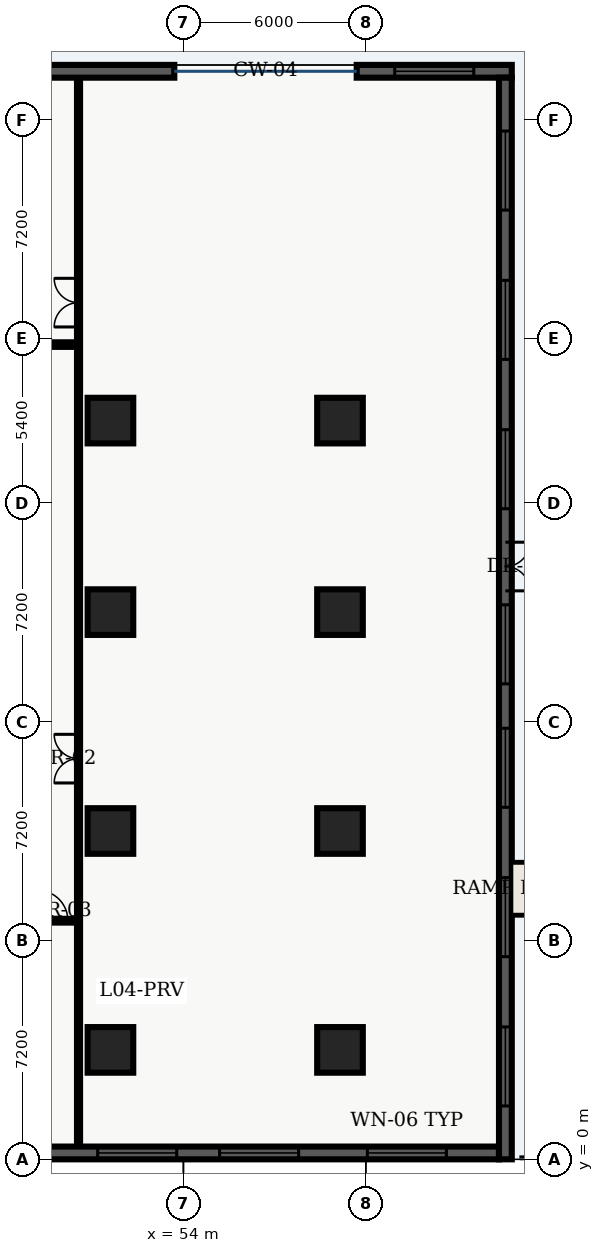
"""IFC4 building model, lengths in metres.
Left out: names, types, materials, properties, quantities, classifications, styles, units other than length and angle.
Written with IfcOpenShell. Run it as: python <this file> out.ifc"""

import sys

from ifc_helpers import new_model, entity, si_unit, converted_unit, direction, frame, origin_with_axes, origin_2d_with_axis, place, context, subcontext, project, spatial, polyline, rectangle, outline, extrude, element, fill, save


model = new_model("IFC4")
c1 = context("Model", 3, precision=1e-05, world=origin_with_axes(), true_north=direction((0.0, 1.0)))
c2 = subcontext(c1, "Body", "Model", "MODEL_VIEW")
j1 = project(units=[si_unit("LENGTHUNIT", "METRE"), converted_unit("PLANEANGLEUNIT", "DEGREE", entity("IfcPlaneAngleMeasure", 0.017), si_unit("PLANEANGLEUNIT", "RADIAN"), dimensions=[0, 0, 0, 0, 0, 0, 0])], contexts=[c1])
p1 = place(None, origin_with_axes())
s1 = spatial("IfcSite", under=j1, at=p1, CompositionType="ELEMENT")
p2 = place(p1, origin_with_axes())
s2 = spatial("IfcBuilding", under=s1, at=p2, CompositionType="ELEMENT")
p3 = place(p2, frame((0.0, 0.0, 19.8), z_axis=(0.0, 0.0, 1.0), x_axis=(1.0, 0.0, 0.0)))
s3 = spatial("IfcBuildingStorey", under=s2, at=p3, CompositionType="ELEMENT", Elevation=19.8)
for number, where, z_axis, x_axis in (
    (1, (51.6, 3.6, 0.0), (0.0, 0.0, 1.0), (1.0, 0.0, 0.0)),
    (2, (51.6, 10.8, 0.0), (0.0, 0.0, 1.0), (1.0, 0.0, 0.0)),
    (3, (51.6, 18.0, 0.0), (0.0, 0.0, 1.0), (1.0, 0.0, 0.0)),
    (4, (51.6, 24.3, 0.0), (0.0, 0.0, 1.0), (1.0, 0.0, 0.0)),
    (5, (59.15, 3.6, 0.0), (0.0, 0.0, 1.0), (1.0, 0.0, 0.0)),
    (6, (59.15, 10.8, 0.0), (0.0, 0.0, 1.0), (1.0, 0.0, 0.0)),
    (7, (59.15, 18.0, 0.0), (0.0, 0.0, 1.0), (1.0, 0.0, 0.0)),
    (8, (59.15, 24.3, 0.0), (0.0, 0.0, 1.0), (1.0, 0.0, 0.0)),
):
    element("IfcColumn", number, at=place(p3, frame(where, z_axis=z_axis, x_axis=x_axis)), inside=s3, PredefinedType="COLUMN", context=c2, shape_type="SweptSolid", body=[
        extrude(rectangle(XDim=1.5, YDim=1.5, at=origin_2d_with_axis()), origin_with_axes(), (0.0, 0.0, 1.0), 4.5),
    ])
p4 = place(p3, frame((50.55, 0.38, 0.0), z_axis=(0.0, 0.0, 1.0), x_axis=(0.0, 1.0, 0.0)))
e9 = element("IfcWall", 9, at=p4, inside=s3, PredefinedType="PARTITIONING", context=c2, shape_type="SweptSolid", body=[
    extrude(outline(polyline([(0.0, -0.05), (35.24, -0.05), (35.24, 0.05), (0.0, 0.05), (0.0, -0.05)])), origin_with_axes(), (0.0, 0.0, 1.0), 3.2),
])
p5 = place(p4, frame((12.8, 0.0, 0.0), z_axis=(0.0, 0.0, 1.0), x_axis=(1.0, 0.0, 0.0)))
e10 = element("IfcOpeningElement", 10, at=p5, cuts=e9, PredefinedType="OPENING", context=c2, shape_type="SweptSolid", body=[
    extrude(rectangle(XDim=1.6, YDim=0.12, at=origin_2d_with_axis()), origin_with_axes(), (0.0, 0.0, 1.0), 2.2),
])
p6 = place(p4, frame((27.8, 0.0, 0.0), z_axis=(0.0, 0.0, 1.0), x_axis=(1.0, 0.0, 0.0)))
e11 = element("IfcOpeningElement", 11, at=p6, cuts=e9, PredefinedType="OPENING", context=c2, shape_type="SweptSolid", body=[
    extrude(rectangle(XDim=1.6, YDim=0.12, at=origin_2d_with_axis()), origin_with_axes(), (0.0, 0.0, 1.0), 2.2),
])
p7 = place(p3, frame((48.05, 7.85, 0.0), z_axis=(0.0, 0.0, 1.0), x_axis=(1.0, 0.0, 0.0)))
e12 = element("IfcWall", 12, at=p7, inside=s3, PredefinedType="PARTITIONING", context=c2, shape_type="SweptSolid", body=[
    extrude(outline(polyline([(0.0, -0.062), (2.5, -0.062), (2.5, 0.062), (0.0, 0.062), (0.0, -0.062)])), origin_with_axes(), (0.0, 0.0, 1.0), 3.2),
])
p8 = place(p7, frame((1.65, 0.0, 0.0), z_axis=(0.0, 0.0, 1.0), x_axis=(1.0, 0.0, 0.0)))
e13 = element("IfcOpeningElement", 13, at=p8, cuts=e12, PredefinedType="OPENING", context=c2, shape_type="SweptSolid", body=[
    extrude(rectangle(XDim=1.0, YDim=0.145, at=origin_2d_with_axis()), origin_with_axes(), (0.0, 0.0, 1.0), 2.15),
])
p9 = place(p3, frame((21.3, 26.8, 0.0), z_axis=(0.0, 0.0, 1.0), x_axis=(1.0, 0.0, 0.0)))
e14 = element("IfcWall", 14, at=p9, inside=s3, PredefinedType="PARTITIONING", context=c2, shape_type="SweptSolid", body=[
    extrude(outline(polyline([(0.0, -0.075), (29.25, -0.075), (29.25, 0.075), (0.0, 0.075), (0.0, -0.075)])), origin_with_axes(), (0.0, 0.0, 1.0), 3.2),
])
p10 = place(p3, frame((64.38, 0.21, 0.0), z_axis=(0.0, 0.0, 1.0), x_axis=(-1.0, 0.0, 0.0)))
e15 = element("IfcWall", 15, at=p10, inside=s3, PredefinedType="SOLIDWALL", context=c2, shape_type="SweptSolid", body=[
    extrude(outline(polyline([(0.0, -0.21), (64.38, -0.21), (64.38, 0.21), (0.0, 0.21), (0.0, -0.21)])), origin_with_axes(), (0.0, 0.0, 1.0), 4.26),
])
p11 = place(p10, frame((3.03, 0.0, 0.45), z_axis=(0.0, 0.0, 1.0), x_axis=(1.0, 0.0, 0.0)))
e16 = element("IfcOpeningElement", 16, at=p11, cuts=e15, PredefinedType="OPENING", context=c2, shape_type="SweptSolid", body=[
    extrude(rectangle(XDim=2.6, YDim=0.44, at=origin_2d_with_axis()), origin_with_axes(), (0.0, 0.0, 1.0), 2.8),
])
p12 = place(p10, frame((7.89, 0.0, 0.45), z_axis=(0.0, 0.0, 1.0), x_axis=(1.0, 0.0, 0.0)))
e17 = element("IfcOpeningElement", 17, at=p12, cuts=e15, PredefinedType="OPENING", context=c2, shape_type="SweptSolid", body=[
    extrude(rectangle(XDim=2.6, YDim=0.44, at=origin_2d_with_axis()), origin_with_axes(), (0.0, 0.0, 1.0), 2.8),
])
p13 = place(p10, frame((11.9, 0.0, 0.45), z_axis=(0.0, 0.0, 1.0), x_axis=(1.0, 0.0, 0.0)))
e18 = element("IfcOpeningElement", 18, at=p13, cuts=e15, PredefinedType="OPENING", context=c2, shape_type="SweptSolid", body=[
    extrude(rectangle(XDim=2.6, YDim=0.44, at=origin_2d_with_axis()), origin_with_axes(), (0.0, 0.0, 1.0), 2.8),
])
p14 = place(p10, frame((17.61, 0.0, 0.45), z_axis=(0.0, 0.0, 1.0), x_axis=(1.0, 0.0, 0.0)))
e19 = element("IfcOpeningElement", 19, at=p14, cuts=e15, PredefinedType="OPENING", context=c2, shape_type="SweptSolid", body=[
    extrude(rectangle(XDim=2.6, YDim=0.44, at=origin_2d_with_axis()), origin_with_axes(), (0.0, 0.0, 1.0), 2.8),
])
p15 = place(p10, frame((22.47, 0.0, 0.45), z_axis=(0.0, 0.0, 1.0), x_axis=(1.0, 0.0, 0.0)))
e20 = element("IfcOpeningElement", 20, at=p15, cuts=e15, PredefinedType="OPENING", context=c2, shape_type="SweptSolid", body=[
    extrude(rectangle(XDim=2.6, YDim=0.44, at=origin_2d_with_axis()), origin_with_axes(), (0.0, 0.0, 1.0), 2.8),
])
p16 = place(p10, frame((27.33, 0.0, 0.45), z_axis=(0.0, 0.0, 1.0), x_axis=(1.0, 0.0, 0.0)))
e21 = element("IfcOpeningElement", 21, at=p16, cuts=e15, PredefinedType="OPENING", context=c2, shape_type="SweptSolid", body=[
    extrude(rectangle(XDim=2.6, YDim=0.44, at=origin_2d_with_axis()), origin_with_axes(), (0.0, 0.0, 1.0), 2.8),
])
p17 = place(p10, frame((32.19, 0.0, 0.45), z_axis=(0.0, 0.0, 1.0), x_axis=(1.0, 0.0, 0.0)))
e22 = element("IfcOpeningElement", 22, at=p17, cuts=e15, PredefinedType="OPENING", context=c2, shape_type="SweptSolid", body=[
    extrude(rectangle(XDim=2.6, YDim=0.44, at=origin_2d_with_axis()), origin_with_axes(), (0.0, 0.0, 1.0), 2.8),
])
p18 = place(p10, frame((37.05, 0.0, 0.45), z_axis=(0.0, 0.0, 1.0), x_axis=(1.0, 0.0, 0.0)))
e23 = element("IfcOpeningElement", 23, at=p18, cuts=e15, PredefinedType="OPENING", context=c2, shape_type="SweptSolid", body=[
    extrude(rectangle(XDim=2.6, YDim=0.44, at=origin_2d_with_axis()), origin_with_axes(), (0.0, 0.0, 1.0), 2.8),
])
p19 = place(p10, frame((41.06, 0.0, 0.45), z_axis=(0.0, 0.0, 1.0), x_axis=(1.0, 0.0, 0.0)))
e24 = element("IfcOpeningElement", 24, at=p19, cuts=e15, PredefinedType="OPENING", context=c2, shape_type="SweptSolid", body=[
    extrude(rectangle(XDim=2.6, YDim=0.44, at=origin_2d_with_axis()), origin_with_axes(), (0.0, 0.0, 1.0), 2.8),
])
p20 = place(p10, frame((46.77, 0.0, 0.45), z_axis=(0.0, 0.0, 1.0), x_axis=(1.0, 0.0, 0.0)))
e25 = element("IfcOpeningElement", 25, at=p20, cuts=e15, PredefinedType="OPENING", context=c2, shape_type="SweptSolid", body=[
    extrude(rectangle(XDim=2.6, YDim=0.44, at=origin_2d_with_axis()), origin_with_axes(), (0.0, 0.0, 1.0), 2.8),
])
p21 = place(p10, frame((50.78, 0.0, 0.45), z_axis=(0.0, 0.0, 1.0), x_axis=(1.0, 0.0, 0.0)))
e26 = element("IfcOpeningElement", 26, at=p21, cuts=e15, PredefinedType="OPENING", context=c2, shape_type="SweptSolid", body=[
    extrude(rectangle(XDim=2.6, YDim=0.44, at=origin_2d_with_axis()), origin_with_axes(), (0.0, 0.0, 1.0), 2.8),
])
p22 = place(p10, frame((56.49, 0.0, 0.45), z_axis=(0.0, 0.0, 1.0), x_axis=(1.0, 0.0, 0.0)))
e27 = element("IfcOpeningElement", 27, at=p22, cuts=e15, PredefinedType="OPENING", context=c2, shape_type="SweptSolid", body=[
    extrude(rectangle(XDim=2.6, YDim=0.44, at=origin_2d_with_axis()), origin_with_axes(), (0.0, 0.0, 1.0), 2.8),
])
p23 = place(p10, frame((61.35, 0.0, 0.45), z_axis=(0.0, 0.0, 1.0), x_axis=(1.0, 0.0, 0.0)))
e28 = element("IfcOpeningElement", 28, at=p23, cuts=e15, PredefinedType="OPENING", context=c2, shape_type="SweptSolid", body=[
    extrude(rectangle(XDim=2.6, YDim=0.44, at=origin_2d_with_axis()), origin_with_axes(), (0.0, 0.0, 1.0), 2.8),
])
p24 = place(p3, frame((48.18, 35.79, 0.0), z_axis=(0.0, 0.0, 1.0), x_axis=(1.0, 0.0, 0.0)))
e29 = element("IfcWall", 29, at=p24, inside=s3, PredefinedType="SOLIDWALL", context=c2, shape_type="SweptSolid", body=[
    extrude(outline(polyline([(0.0, -0.21), (5.52, -0.21), (5.52, 0.21), (0.0, 0.21), (0.0, -0.21)])), origin_with_axes(), (0.0, 0.0, 1.0), 4.26),
])
p25 = place(p3, frame((59.7, 35.79, 0.0), z_axis=(0.0, 0.0, 1.0), x_axis=(1.0, 0.0, 0.0)))
e30 = element("IfcWall", 30, at=p25, inside=s3, PredefinedType="SOLIDWALL", context=c2, shape_type="SweptSolid", body=[
    extrude(outline(polyline([(0.0, -0.21), (5.1, -0.21), (5.1, 0.21), (0.0, 0.21), (0.0, -0.21)])), origin_with_axes(), (0.0, 0.0, 1.0), 4.26),
])
p26 = place(p25, frame((2.55, 0.0, 0.45), z_axis=(0.0, 0.0, 1.0), x_axis=(1.0, 0.0, 0.0)))
e31 = element("IfcOpeningElement", 31, at=p26, cuts=e30, PredefinedType="OPENING", context=c2, shape_type="SweptSolid", body=[
    extrude(rectangle(XDim=2.6, YDim=0.44, at=origin_2d_with_axis()), origin_with_axes(), (0.0, 0.0, 1.0), 2.8),
])
p27 = place(p3, frame((64.59, 35.58, 0.0), z_axis=(0.0, 0.0, 1.0), x_axis=(0.0, -1.0, 0.0)))
e32 = element("IfcWall", 32, at=p27, inside=s3, PredefinedType="SOLIDWALL", context=c2, shape_type="SweptSolid", body=[
    extrude(outline(polyline([(0.0, -0.21), (35.58, -0.21), (35.58, 0.21), (0.0, 0.21), (0.0, -0.21)])), origin_with_axes(), (0.0, 0.0, 1.0), 4.26),
])
p28 = place(p27, frame((16.08, 0.0, 0.0), z_axis=(0.0, 0.0, 1.0), x_axis=(1.0, 0.0, 0.0)))
e33 = element("IfcOpeningElement", 33, at=p28, cuts=e32, PredefinedType="OPENING", context=c2, shape_type="SweptSolid", body=[
    extrude(rectangle(XDim=1.6, YDim=0.44, at=origin_2d_with_axis()), origin_with_axes(), (0.0, 0.0, 1.0), 2.2),
])
p29 = place(p27, frame((3.056, 0.0, 0.45), z_axis=(0.0, 0.0, 1.0), x_axis=(1.0, 0.0, 0.0)))
e34 = element("IfcOpeningElement", 34, at=p29, cuts=e32, PredefinedType="OPENING", context=c2, shape_type="SweptSolid", body=[
    extrude(rectangle(XDim=2.6, YDim=0.44, at=origin_2d_with_axis()), origin_with_axes(), (0.0, 0.0, 1.0), 2.8),
])
p30 = place(p27, frame((7.967, 0.0, 0.45), z_axis=(0.0, 0.0, 1.0), x_axis=(1.0, 0.0, 0.0)))
e35 = element("IfcOpeningElement", 35, at=p30, cuts=e32, PredefinedType="OPENING", context=c2, shape_type="SweptSolid", body=[
    extrude(rectangle(XDim=2.6, YDim=0.44, at=origin_2d_with_axis()), origin_with_axes(), (0.0, 0.0, 1.0), 2.8),
])
p31 = place(p27, frame((12.879, 0.0, 0.45), z_axis=(0.0, 0.0, 1.0), x_axis=(1.0, 0.0, 0.0)))
e36 = element("IfcOpeningElement", 36, at=p31, cuts=e32, PredefinedType="OPENING", context=c2, shape_type="SweptSolid", body=[
    extrude(rectangle(XDim=2.6, YDim=0.44, at=origin_2d_with_axis()), origin_with_axes(), (0.0, 0.0, 1.0), 2.8),
])
p32 = place(p27, frame((18.64, 0.0, 0.45), z_axis=(0.0, 0.0, 1.0), x_axis=(1.0, 0.0, 0.0)))
e37 = element("IfcOpeningElement", 37, at=p32, cuts=e32, PredefinedType="OPENING", context=c2, shape_type="SweptSolid", body=[
    extrude(rectangle(XDim=2.6, YDim=0.44, at=origin_2d_with_axis()), origin_with_axes(), (0.0, 0.0, 1.0), 2.8),
])
p33 = place(p27, frame((22.701, 0.0, 0.45), z_axis=(0.0, 0.0, 1.0), x_axis=(1.0, 0.0, 0.0)))
e38 = element("IfcOpeningElement", 38, at=p33, cuts=e32, PredefinedType="OPENING", context=c2, shape_type="SweptSolid", body=[
    extrude(rectangle(XDim=2.6, YDim=0.44, at=origin_2d_with_axis()), origin_with_axes(), (0.0, 0.0, 1.0), 2.8),
])
p34 = place(p27, frame((27.613, 0.0, 0.45), z_axis=(0.0, 0.0, 1.0), x_axis=(1.0, 0.0, 0.0)))
e39 = element("IfcOpeningElement", 39, at=p34, cuts=e32, PredefinedType="OPENING", context=c2, shape_type="SweptSolid", body=[
    extrude(rectangle(XDim=2.6, YDim=0.44, at=origin_2d_with_axis()), origin_with_axes(), (0.0, 0.0, 1.0), 2.8),
])
p35 = place(p27, frame((32.524, 0.0, 0.45), z_axis=(0.0, 0.0, 1.0), x_axis=(1.0, 0.0, 0.0)))
e40 = element("IfcOpeningElement", 40, at=p35, cuts=e32, PredefinedType="OPENING", context=c2, shape_type="SweptSolid", body=[
    extrude(rectangle(XDim=2.6, YDim=0.44, at=origin_2d_with_axis()), origin_with_axes(), (0.0, 0.0, 1.0), 2.8),
])
p36 = place(p7, frame((1.65, 0.0, 0.0), z_axis=(0.0, 0.0, 1.0), x_axis=(1.0, 0.0, 0.0)))
e41 = element("IfcDoor", 41, at=p36, inside=s3, OperationType="SINGLE_SWING_LEFT", PredefinedType="DOOR", context=c2, shape_type="SweptSolid", body=[
    extrude(rectangle(XDim=1.0, YDim=0.075, at=origin_2d_with_axis()), origin_with_axes(), (0.0, 0.0, 1.0), 2.15),
])
fill(e13, e41)
p37 = place(p4, frame((12.8, 0.0, 0.0), z_axis=(0.0, 0.0, 1.0), x_axis=(1.0, 0.0, 0.0)))
e42 = element("IfcDoor", 42, at=p37, inside=s3, OperationType="DOUBLE_DOOR_SINGLE_SWING", PredefinedType="DOOR", context=c2, shape_type="SweptSolid", body=[
    extrude(rectangle(XDim=1.6, YDim=0.06, at=origin_2d_with_axis()), origin_with_axes(), (0.0, 0.0, 1.0), 2.2),
])
fill(e10, e42)
p38 = place(p4, frame((27.8, 0.0, 0.0), z_axis=(0.0, 0.0, 1.0), x_axis=(1.0, 0.0, 0.0)))
e43 = element("IfcDoor", 43, at=p38, inside=s3, OperationType="DOUBLE_DOOR_SINGLE_SWING", PredefinedType="DOOR", context=c2, shape_type="SweptSolid", body=[
    extrude(rectangle(XDim=1.6, YDim=0.06, at=origin_2d_with_axis()), origin_with_axes(), (0.0, 0.0, 1.0), 2.2),
])
fill(e11, e43)
p39 = place(p27, frame((16.08, 0.0, 0.0), z_axis=(0.0, 0.0, 1.0), x_axis=(1.0, 0.0, 0.0)))
e44 = element("IfcDoor", 44, at=p39, inside=s3, OperationType="DOUBLE_DOOR_SINGLE_SWING", PredefinedType="DOOR", context=c2, shape_type="SweptSolid", body=[
    extrude(rectangle(XDim=1.6, YDim=0.09, at=origin_2d_with_axis()), origin_with_axes(), (0.0, 0.0, 1.0), 2.2),
])
fill(e33, e44)
p40 = place(p10, frame((3.03, 0.0, 0.45), z_axis=(0.0, 0.0, 1.0), x_axis=(1.0, 0.0, 0.0)))
e45 = element("IfcWindow", 45, at=p40, inside=s3, PredefinedType="WINDOW", context=c2, shape_type="SweptSolid", body=[
    extrude(rectangle(XDim=2.6, YDim=0.09, at=origin_2d_with_axis()), origin_with_axes(), (0.0, 0.0, 1.0), 2.8),
])
fill(e16, e45)
p41 = place(p10, frame((7.89, 0.0, 0.45), z_axis=(0.0, 0.0, 1.0), x_axis=(1.0, 0.0, 0.0)))
e46 = element("IfcWindow", 46, at=p41, inside=s3, PredefinedType="WINDOW", context=c2, shape_type="SweptSolid", body=[
    extrude(rectangle(XDim=2.6, YDim=0.09, at=origin_2d_with_axis()), origin_with_axes(), (0.0, 0.0, 1.0), 2.8),
])
fill(e17, e46)
p42 = place(p10, frame((11.9, 0.0, 0.45), z_axis=(0.0, 0.0, 1.0), x_axis=(1.0, 0.0, 0.0)))
e47 = element("IfcWindow", 47, at=p42, inside=s3, PredefinedType="WINDOW", context=c2, shape_type="SweptSolid", body=[
    extrude(rectangle(XDim=2.6, YDim=0.09, at=origin_2d_with_axis()), origin_with_axes(), (0.0, 0.0, 1.0), 2.8),
])
fill(e18, e47)
p43 = place(p25, frame((2.55, 0.0, 0.45), z_axis=(0.0, 0.0, 1.0), x_axis=(1.0, 0.0, 0.0)))
e48 = element("IfcWindow", 48, at=p43, inside=s3, PredefinedType="WINDOW", context=c2, shape_type="SweptSolid", body=[
    extrude(rectangle(XDim=2.6, YDim=0.09, at=origin_2d_with_axis()), origin_with_axes(), (0.0, 0.0, 1.0), 2.8),
])
fill(e31, e48)
p44 = place(p27, frame((3.056, 0.0, 0.45), z_axis=(0.0, 0.0, 1.0), x_axis=(1.0, 0.0, 0.0)))
e49 = element("IfcWindow", 49, at=p44, inside=s3, PredefinedType="WINDOW", context=c2, shape_type="SweptSolid", body=[
    extrude(rectangle(XDim=2.6, YDim=0.09, at=origin_2d_with_axis()), origin_with_axes(), (0.0, 0.0, 1.0), 2.8),
])
fill(e34, e49)
p45 = place(p27, frame((7.967, 0.0, 0.45), z_axis=(0.0, 0.0, 1.0), x_axis=(1.0, 0.0, 0.0)))
e50 = element("IfcWindow", 50, at=p45, inside=s3, PredefinedType="WINDOW", context=c2, shape_type="SweptSolid", body=[
    extrude(rectangle(XDim=2.6, YDim=0.09, at=origin_2d_with_axis()), origin_with_axes(), (0.0, 0.0, 1.0), 2.8),
])
fill(e35, e50)
p46 = place(p27, frame((12.879, 0.0, 0.45), z_axis=(0.0, 0.0, 1.0), x_axis=(1.0, 0.0, 0.0)))
e51 = element("IfcWindow", 51, at=p46, inside=s3, PredefinedType="WINDOW", context=c2, shape_type="SweptSolid", body=[
    extrude(rectangle(XDim=2.6, YDim=0.09, at=origin_2d_with_axis()), origin_with_axes(), (0.0, 0.0, 1.0), 2.8),
])
fill(e36, e51)
p47 = place(p27, frame((18.64, 0.0, 0.45), z_axis=(0.0, 0.0, 1.0), x_axis=(1.0, 0.0, 0.0)))
e52 = element("IfcWindow", 52, at=p47, inside=s3, PredefinedType="WINDOW", context=c2, shape_type="SweptSolid", body=[
    extrude(rectangle(XDim=2.6, YDim=0.09, at=origin_2d_with_axis()), origin_with_axes(), (0.0, 0.0, 1.0), 2.8),
])
fill(e37, e52)
p48 = place(p27, frame((22.701, 0.0, 0.45), z_axis=(0.0, 0.0, 1.0), x_axis=(1.0, 0.0, 0.0)))
e53 = element("IfcWindow", 53, at=p48, inside=s3, PredefinedType="WINDOW", context=c2, shape_type="SweptSolid", body=[
    extrude(rectangle(XDim=2.6, YDim=0.09, at=origin_2d_with_axis()), origin_with_axes(), (0.0, 0.0, 1.0), 2.8),
])
fill(e38, e53)
p49 = place(p27, frame((27.613, 0.0, 0.45), z_axis=(0.0, 0.0, 1.0), x_axis=(1.0, 0.0, 0.0)))
e54 = element("IfcWindow", 54, at=p49, inside=s3, PredefinedType="WINDOW", context=c2, shape_type="SweptSolid", body=[
    extrude(rectangle(XDim=2.6, YDim=0.09, at=origin_2d_with_axis()), origin_with_axes(), (0.0, 0.0, 1.0), 2.8),
])
fill(e39, e54)
p50 = place(p27, frame((32.524, 0.0, 0.45), z_axis=(0.0, 0.0, 1.0), x_axis=(1.0, 0.0, 0.0)))
e55 = element("IfcWindow", 55, at=p50, inside=s3, PredefinedType="WINDOW", context=c2, shape_type="SweptSolid", body=[
    extrude(rectangle(XDim=2.6, YDim=0.09, at=origin_2d_with_axis()), origin_with_axes(), (0.0, 0.0, 1.0), 2.8),
])
fill(e40, e55)
save(model, sys.argv[1])
